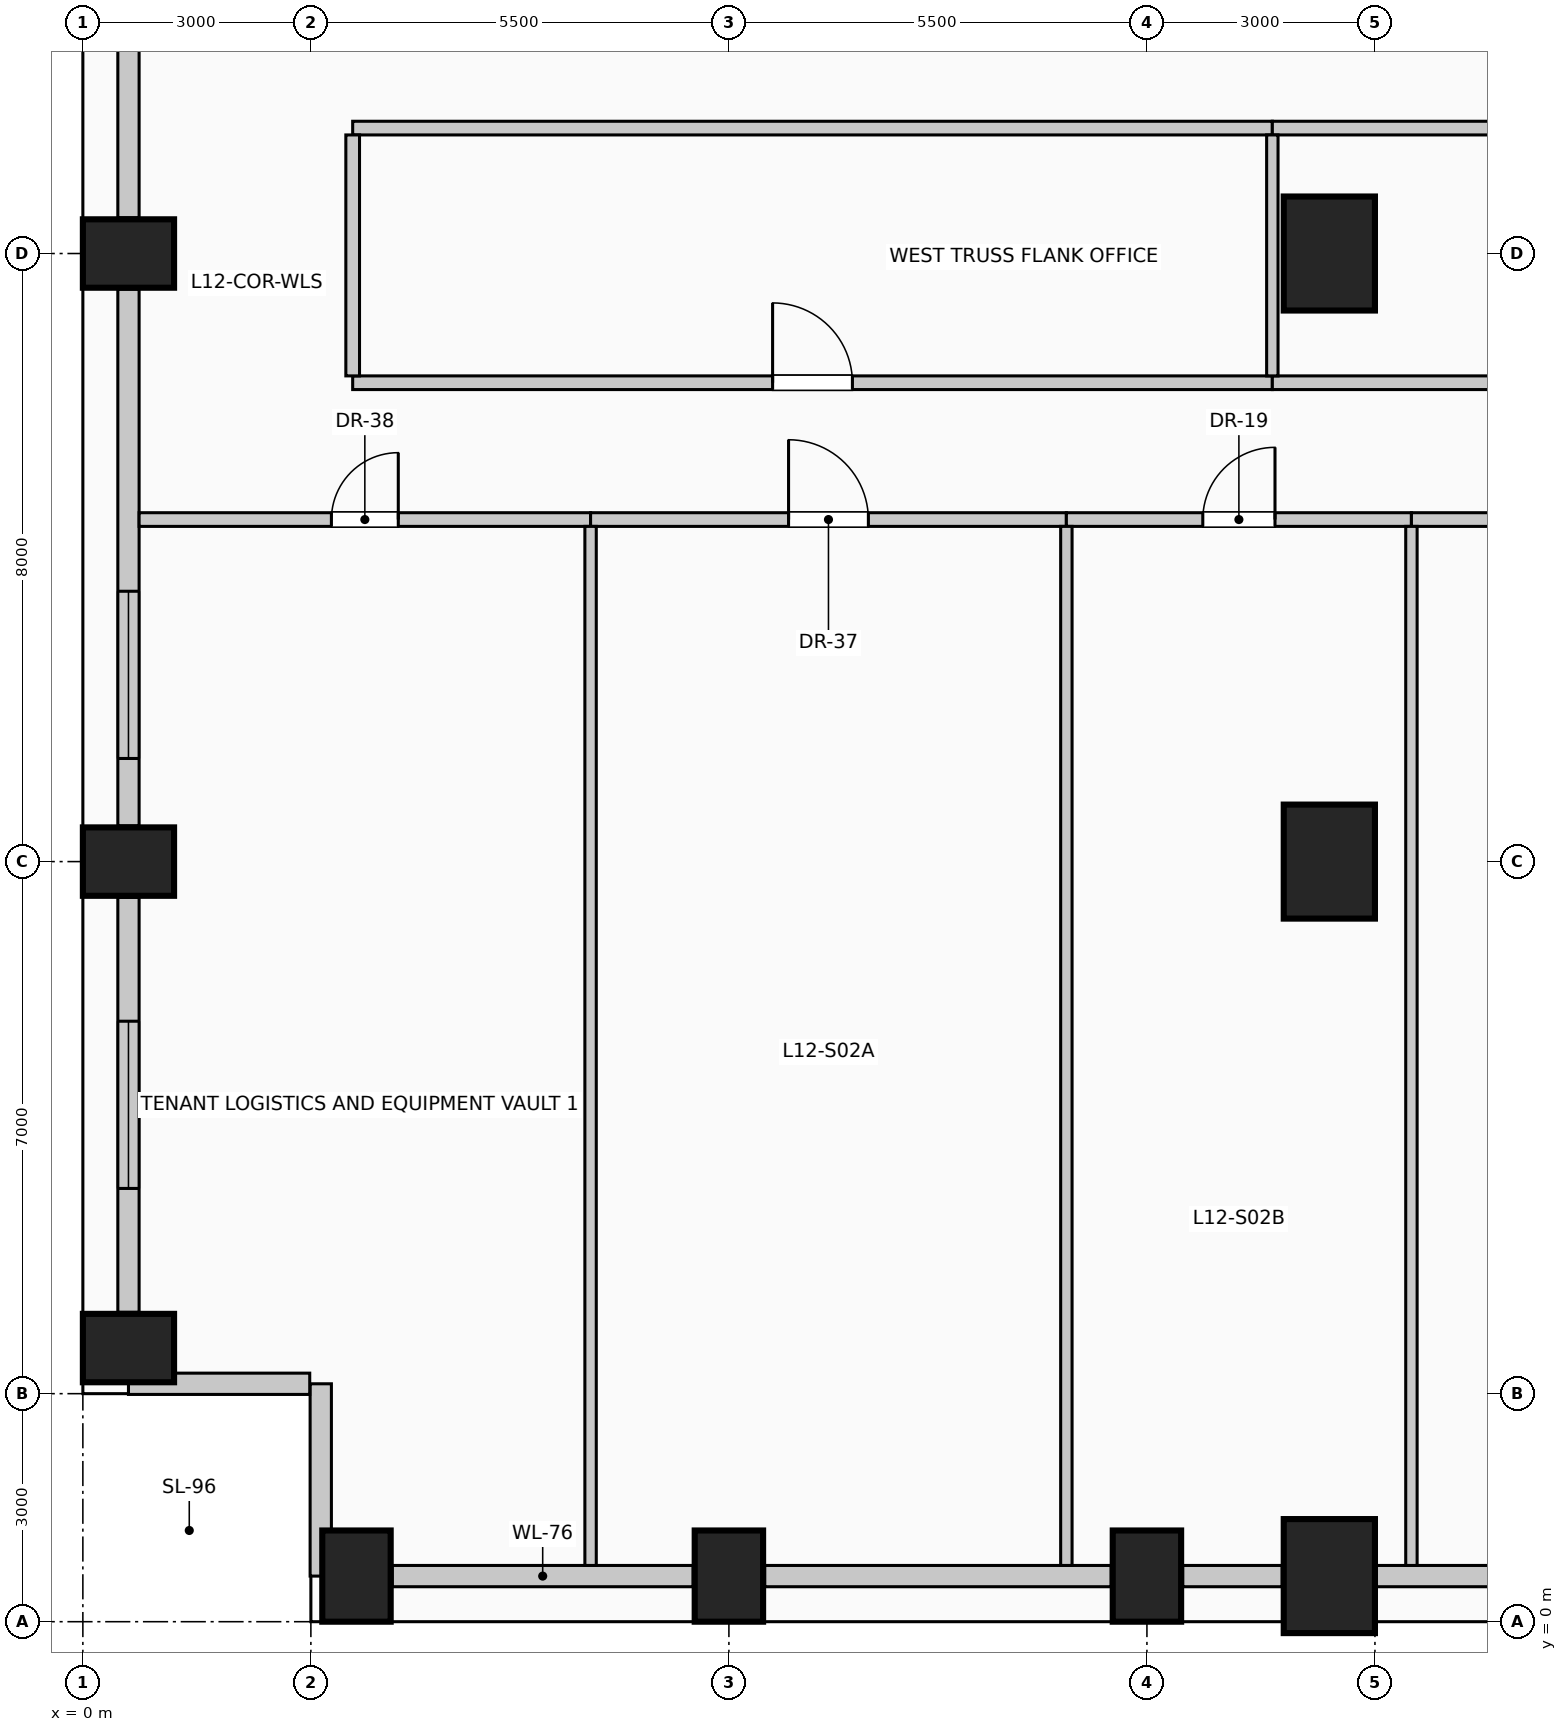
"""IFC4 building model, lengths in metres.
Left out: names, types, materials, properties, quantities, classifications, styles, units other than length and angle.
Written with IfcOpenShell. Run it as: python <this file> out.ifc"""

import sys

from ifc_helpers import new_model, si_unit, direction, frame, frame_2d, origin, origin_2d, place, context, subcontext, project, spatial, rectangle, extrude, element, fill, save


model = new_model("IFC4")
c1 = context("Model", 3, precision=1e-05, world=origin(), true_north=direction((0.0, 1.0)))
c2 = subcontext(c1, "Body", "Model", "MODEL_VIEW")
j1 = project(units=[si_unit("LENGTHUNIT", "METRE"), si_unit("PLANEANGLEUNIT", "RADIAN")], contexts=[c1])
p1 = place(None, origin())
s1 = spatial("IfcSite", under=j1, at=p1, CompositionType="ELEMENT")
p2 = place(p1, origin())
s2 = spatial("IfcBuilding", under=s1, at=p2, CompositionType="ELEMENT")
p3 = place(p2, frame((0.0, 0.0, 50.6)))
s3 = spatial("IfcBuildingStorey", under=s2, at=p3, CompositionType="ELEMENT", Elevation=50.6)
for number, where, z_axis, x_axis in (
    (1, (3.6, 0.6, 0.0), (0.0, 0.0, 1.0), (1.0, 0.0, 0.0)),
    (2, (8.5, 0.6, 0.0), (0.0, 0.0, 1.0), (1.0, 0.0, 0.0)),
    (3, (14.0, 0.6, 0.0), (0.0, 0.0, 1.0), (1.0, 0.0, 0.0)),
):
    element("IfcColumn", number, at=place(p3, frame(where, z_axis=z_axis, x_axis=x_axis)), inside=s3, PredefinedType="COLUMN", context=c2, shape_type="SweptSolid", body=[
        extrude(rectangle(XDim=0.9, YDim=1.2, at=origin_2d()), origin(), (0.0, 0.0, 1.0), 4.0),
    ])
p4 = place(p3, frame((16.4, 0.6, 0.0), z_axis=(0.0, 0.0, 1.0), x_axis=(1.0, 0.0, 0.0)))
e4 = element("IfcColumn", 4, at=p4, inside=s3, PredefinedType="COLUMN", context=c2, shape_type="SweptSolid", body=[
    extrude(rectangle(XDim=1.2, YDim=1.5, at=origin_2d()), origin(), (0.0, 0.0, 1.0), 4.0),
])
for number, where, z_axis, x_axis in (
    (5, (0.6, 3.6, 0.0), (0.0, 0.0, 1.0), (0.0, 1.0, 0.0)),
    (6, (0.6, 10.0, 0.0), (0.0, 0.0, 1.0), (0.0, 1.0, 0.0)),
    (7, (0.6, 18.0, 0.0), (0.0, 0.0, 1.0), (0.0, 1.0, 0.0)),
):
    element("IfcColumn", number, at=place(p3, frame(where, z_axis=z_axis, x_axis=x_axis)), inside=s3, PredefinedType="COLUMN", context=c2, shape_type="SweptSolid", body=[
        extrude(rectangle(XDim=0.9, YDim=1.2, at=origin_2d()), origin(), (0.0, 0.0, 1.0), 4.0),
    ])
for number, where, z_axis, x_axis in (
    (8, (16.4, 10.0, 0.0), (0.0, 0.0, 1.0), (1.0, 0.0, 0.0)),
    (9, (16.4, 18.0, 0.0), (0.0, 0.0, 1.0), (1.0, 0.0, 0.0)),
):
    element("IfcColumn", number, at=place(p3, frame(where, z_axis=z_axis, x_axis=x_axis)), inside=s3, PredefinedType="COLUMN", context=c2, shape_type="SweptSolid", body=[
        extrude(rectangle(XDim=1.2, YDim=1.5, at=origin_2d()), origin(), (0.0, 0.0, 1.0), 4.0),
    ])
p5 = place(p3, frame((8.03, 0.6, 0.0), z_axis=(0.0, 0.0, 1.0), x_axis=(-1.0, 0.0, 0.0)))
e10 = element("IfcWall", 10, at=p5, inside=s3, PredefinedType="SOLIDWALL", context=c2, shape_type="SweptSolid", body=[
    extrude(rectangle(XDim=3.96, YDim=0.28, at=frame_2d((1.98, 0.0))), origin(), (0.0, 0.0, 1.0), 2.85),
])
p6 = place(p3, frame((13.53, 0.6, 0.0), z_axis=(0.0, 0.0, 1.0), x_axis=(-1.0, 0.0, 0.0)))
e11 = element("IfcWall", 11, at=p6, inside=s3, PredefinedType="SOLIDWALL", context=c2, shape_type="SweptSolid", body=[
    extrude(rectangle(XDim=4.56, YDim=0.28, at=frame_2d((2.28, 0.0))), origin(), (0.0, 0.0, 1.0), 2.85),
])
p7 = place(p3, frame((15.78, 0.6, 0.0), z_axis=(0.0, 0.0, 1.0), x_axis=(-1.0, 0.0, 0.0)))
e12 = element("IfcWall", 12, at=p7, inside=s3, PredefinedType="SOLIDWALL", context=c2, shape_type="SweptSolid", body=[
    extrude(rectangle(XDim=1.31, YDim=0.28, at=frame_2d((0.655, 0.0))), origin(), (0.0, 0.0, 1.0), 2.85),
])
p8 = place(p3, frame((23.38, 0.6, 0.0), z_axis=(0.0, 0.0, 1.0), x_axis=(-1.0, 0.0, 0.0)))
e13 = element("IfcWall", 13, at=p8, inside=s3, PredefinedType="SOLIDWALL", context=c2, shape_type="SweptSolid", body=[
    extrude(rectangle(XDim=6.36, YDim=0.28, at=frame_2d((3.18, 0.0))), origin(), (0.0, 0.0, 1.0), 2.85),
])
p9 = place(p3, frame((0.6, 4.07, 0.0), z_axis=(0.0, 0.0, 1.0), x_axis=(0.0, 1.0, 0.0)))
e14 = element("IfcWall", 14, at=p9, inside=s3, PredefinedType="SOLIDWALL", context=c2, shape_type="SweptSolid", body=[
    extrude(rectangle(XDim=5.46, YDim=0.28, at=frame_2d((2.73, 0.0))), origin(), (0.0, 0.0, 1.0), 2.85),
])
p10 = place(p9, frame((1.63, 0.0, 0.5)))
e15 = element("IfcOpeningElement", 15, at=p10, cuts=e14, PredefinedType="OPENING", context=c2, shape_type="SweptSolid", body=[
    extrude(rectangle(XDim=2.2, YDim=1.95, at=frame_2d((1.1, 0.975))), frame((0.0, 0.15, 0.0), z_axis=(0.0, -1.0, 0.0), x_axis=(1.0, 0.0, 0.0)), (0.0, 0.0, 1.0), 0.3),
])
p11 = place(p3, frame((0.6, 10.47, 0.0), z_axis=(0.0, 0.0, 1.0), x_axis=(0.0, 1.0, 0.0)))
e16 = element("IfcWall", 16, at=p11, inside=s3, PredefinedType="SOLIDWALL", context=c2, shape_type="SweptSolid", body=[
    extrude(rectangle(XDim=7.06, YDim=0.28, at=frame_2d((3.53, 0.0))), origin(), (0.0, 0.0, 1.0), 2.85),
])
p12 = place(p11, frame((0.887, 0.0, 0.5)))
e17 = element("IfcOpeningElement", 17, at=p12, cuts=e16, PredefinedType="OPENING", context=c2, shape_type="SweptSolid", body=[
    extrude(rectangle(XDim=2.2, YDim=1.95, at=frame_2d((1.1, 0.975))), frame((0.0, 0.15, 0.0), z_axis=(0.0, -1.0, 0.0), x_axis=(1.0, 0.0, 0.0)), (0.0, 0.0, 1.0), 0.3),
])
p13 = place(p3, frame((0.6, 18.47, 0.0), z_axis=(0.0, 0.0, 1.0), x_axis=(0.0, 1.0, 0.0)))
e18 = element("IfcWall", 18, at=p13, inside=s3, PredefinedType="SOLIDWALL", context=c2, shape_type="SweptSolid", body=[
    extrude(rectangle(XDim=7.06, YDim=0.28, at=frame_2d((3.53, 0.0))), origin(), (0.0, 0.0, 1.0), 2.85),
])
p14 = place(p3, frame((3.13, 0.6, 0.0), z_axis=(0.0, 0.0, 1.0), x_axis=(0.0, 1.0, 0.0)))
e19 = element("IfcWall", 19, at=p14, inside=s3, PredefinedType="SOLIDWALL", context=c2, shape_type="SweptSolid", body=[
    extrude(rectangle(XDim=2.53, YDim=0.28, at=frame_2d((1.265, 0.0))), origin(), (0.0, 0.0, 1.0), 3.7),
])
p15 = place(p3, frame((2.985, 3.13, 0.0), z_axis=(0.0, 0.0, 1.0), x_axis=(-1.0, 0.0, 0.0)))
e20 = element("IfcWall", 20, at=p15, inside=s3, PredefinedType="SOLIDWALL", context=c2, shape_type="SweptSolid", body=[
    extrude(rectangle(XDim=2.385, YDim=0.28, at=frame_2d((1.192, 0.0))), origin(), (0.0, 0.0, 1.0), 3.7),
])
p16 = place(p3, frame((0.74, 14.5, 0.0), z_axis=(0.0, 0.0, 1.0), x_axis=(1.0, 0.0, 0.0)))
e21 = element("IfcWall", 21, at=p16, inside=s3, PredefinedType="PARTITIONING", context=c2, shape_type="SweptSolid", body=[
    extrude(rectangle(XDim=5.94, YDim=0.18, at=frame_2d((2.97, 0.0))), origin(), (0.0, 0.0, 1.0), 3.7),
])
p17 = place(p16, frame((2.53, 0.0, 0.0)))
e22 = element("IfcOpeningElement", 22, at=p17, cuts=e21, PredefinedType="OPENING", context=c2, shape_type="SweptSolid", body=[
    extrude(rectangle(XDim=0.88, YDim=2.1, at=frame_2d((0.44, 1.05))), frame((0.0, 0.1, 0.0), z_axis=(0.0, -1.0, 0.0), x_axis=(1.0, 0.0, 0.0)), (0.0, 0.0, 1.0), 0.2),
])
p18 = place(p3, frame((6.68, 14.5, 0.0), z_axis=(0.0, 0.0, 1.0), x_axis=(1.0, 0.0, 0.0)))
e23 = element("IfcWall", 23, at=p18, inside=s3, PredefinedType="PARTITIONING", context=c2, shape_type="SweptSolid", body=[
    extrude(rectangle(XDim=6.26, YDim=0.18, at=frame_2d((3.13, 0.0))), origin(), (0.0, 0.0, 1.0), 3.7),
])
p19 = place(p18, frame((2.605, 0.0, 0.0)))
e24 = element("IfcOpeningElement", 24, at=p19, cuts=e23, PredefinedType="OPENING", context=c2, shape_type="SweptSolid", body=[
    extrude(rectangle(XDim=1.05, YDim=2.15, at=frame_2d((0.525, 1.075))), frame((0.0, 0.1, 0.0), z_axis=(0.0, -1.0, 0.0), x_axis=(1.0, 0.0, 0.0)), (0.0, 0.0, 1.0), 0.2),
])
p20 = place(p3, frame((12.94, 14.5, 0.0), z_axis=(0.0, 0.0, 1.0), x_axis=(1.0, 0.0, 0.0)))
e25 = element("IfcWall", 25, at=p20, inside=s3, PredefinedType="PARTITIONING", context=c2, shape_type="SweptSolid", body=[
    extrude(rectangle(XDim=4.54, YDim=0.18, at=frame_2d((2.27, 0.0))), origin(), (0.0, 0.0, 1.0), 3.7),
])
p21 = place(p20, frame((1.795, 0.0, 0.0)))
e26 = element("IfcOpeningElement", 26, at=p21, cuts=e25, PredefinedType="OPENING", context=c2, shape_type="SweptSolid", body=[
    extrude(rectangle(XDim=0.95, YDim=2.15, at=frame_2d((0.475, 1.075))), frame((0.0, 0.1, 0.0), z_axis=(0.0, -1.0, 0.0), x_axis=(1.0, 0.0, 0.0)), (0.0, 0.0, 1.0), 0.2),
])
p22 = place(p3, frame((17.48, 14.5, 0.0), z_axis=(0.0, 0.0, 1.0), x_axis=(1.0, 0.0, 0.0)))
e27 = element("IfcWall", 27, at=p22, inside=s3, PredefinedType="PARTITIONING", context=c2, shape_type="SweptSolid", body=[
    extrude(rectangle(XDim=11.52, YDim=0.18, at=frame_2d((5.76, 0.0))), origin(), (0.0, 0.0, 1.0), 3.7),
])
p23 = place(p22, frame((5.235, 0.0, 0.0)))
e28 = element("IfcOpeningElement", 28, at=p23, cuts=e27, PredefinedType="OPENING", context=c2, shape_type="SweptSolid", body=[
    extrude(rectangle(XDim=1.05, YDim=2.15, at=frame_2d((0.525, 1.075))), frame((0.0, 0.1, 0.0), z_axis=(0.0, -1.0, 0.0), x_axis=(1.0, 0.0, 0.0)), (0.0, 0.0, 1.0), 0.2),
])
p24 = place(p3, frame((3.55, 16.3, 0.0), z_axis=(0.0, 0.0, 1.0), x_axis=(1.0, 0.0, 0.0)))
e29 = element("IfcWall", 29, at=p24, inside=s3, PredefinedType="PARTITIONING", context=c2, shape_type="SweptSolid", body=[
    extrude(rectangle(XDim=12.1, YDim=0.18, at=frame_2d((6.05, 0.0))), origin(), (0.0, 0.0, 1.0), 3.7),
])
p25 = place(p24, frame((5.525, 0.0, 0.0)))
e30 = element("IfcOpeningElement", 30, at=p25, cuts=e29, PredefinedType="OPENING", context=c2, shape_type="SweptSolid", body=[
    extrude(rectangle(XDim=1.05, YDim=2.15, at=frame_2d((0.525, 1.075))), frame((0.0, 0.1, 0.0), z_axis=(0.0, -1.0, 0.0), x_axis=(1.0, 0.0, 0.0)), (0.0, 0.0, 1.0), 0.2),
])
p26 = place(p3, frame((15.65, 16.3, 0.0), z_axis=(0.0, 0.0, 1.0), x_axis=(1.0, 0.0, 0.0)))
e31 = element("IfcWall", 31, at=p26, inside=s3, PredefinedType="PARTITIONING", context=c2, shape_type="SweptSolid", body=[
    extrude(rectangle(XDim=26.7, YDim=0.18, at=frame_2d((13.35, 0.0))), origin(), (0.0, 0.0, 1.0), 3.7),
])
p27 = place(p3, frame((3.55, 19.65, 0.0), z_axis=(0.0, 0.0, 1.0), x_axis=(1.0, 0.0, 0.0)))
e32 = element("IfcWall", 32, at=p27, inside=s3, PredefinedType="PARTITIONING", context=c2, shape_type="SweptSolid", body=[
    extrude(rectangle(XDim=12.1, YDim=0.18, at=frame_2d((6.05, 0.0))), origin(), (0.0, 0.0, 1.0), 3.7),
])
p28 = place(p3, frame((15.65, 19.65, 0.0), z_axis=(0.0, 0.0, 1.0), x_axis=(1.0, 0.0, 0.0)))
e33 = element("IfcWall", 33, at=p28, inside=s3, PredefinedType="PARTITIONING", context=c2, shape_type="SweptSolid", body=[
    extrude(rectangle(XDim=26.7, YDim=0.18, at=frame_2d((13.35, 0.0))), origin(), (0.0, 0.0, 1.0), 3.7),
])
p29 = place(p3, frame((3.55, 16.39, 0.0), z_axis=(0.0, 0.0, 1.0), x_axis=(0.0, 1.0, 0.0)))
e34 = element("IfcWall", 34, at=p29, inside=s3, PredefinedType="PARTITIONING", context=c2, shape_type="SweptSolid", body=[
    extrude(rectangle(XDim=3.17, YDim=0.18, at=frame_2d((1.585, 0.0))), origin(), (0.0, 0.0, 1.0), 3.7),
])
for number, where, z_axis, x_axis in (
    (35, (6.68, 0.74, 0.0), (0.0, 0.0, 1.0), (0.0, 1.0, 0.0)),
    (36, (12.94, 0.74, 0.0), (0.0, 0.0, 1.0), (0.0, 1.0, 0.0)),
):
    element("IfcWall", number, at=place(p3, frame(where, z_axis=z_axis, x_axis=x_axis)), inside=s3, PredefinedType="PARTITIONING", context=c2, shape_type="SweptSolid", body=[
        extrude(rectangle(XDim=13.67, YDim=0.15, at=frame_2d((6.835, 0.0))), origin(), (0.0, 0.0, 1.0), 3.7),
    ])
p30 = place(p3, frame((15.65, 16.39, 0.0), z_axis=(0.0, 0.0, 1.0), x_axis=(0.0, 1.0, 0.0)))
e37 = element("IfcWall", 37, at=p30, inside=s3, PredefinedType="PARTITIONING", context=c2, shape_type="SweptSolid", body=[
    extrude(rectangle(XDim=3.17, YDim=0.15, at=frame_2d((1.585, 0.0))), origin(), (0.0, 0.0, 1.0), 3.7),
])
p31 = place(p3, frame((17.48, 0.74, 0.0), z_axis=(0.0, 0.0, 1.0), x_axis=(0.0, 1.0, 0.0)))
e38 = element("IfcWall", 38, at=p31, inside=s3, PredefinedType="PARTITIONING", context=c2, shape_type="SweptSolid", body=[
    extrude(rectangle(XDim=13.67, YDim=0.15, at=frame_2d((6.835, 0.0))), origin(), (0.0, 0.0, 1.0), 3.7),
])
p32 = place(p10, origin())
e39 = element("IfcWindow", 39, at=p32, inside=s3, PartitioningType="SINGLE_PANEL", PredefinedType="WINDOW", context=c2, shape_type="SweptSolid", body=[
    extrude(rectangle(XDim=2.2, YDim=1.95, at=frame_2d((1.1, 0.975))), frame((0.0, 0.03, 0.0), z_axis=(0.0, -1.0, 0.0), x_axis=(1.0, 0.0, 0.0)), (0.0, 0.0, 1.0), 0.06),
])
fill(e15, e39)
p33 = place(p12, origin())
e40 = element("IfcWindow", 40, at=p33, inside=s3, PartitioningType="SINGLE_PANEL", PredefinedType="WINDOW", context=c2, shape_type="SweptSolid", body=[
    extrude(rectangle(XDim=2.2, YDim=1.95, at=frame_2d((1.1, 0.975))), frame((0.0, 0.03, 0.0), z_axis=(0.0, -1.0, 0.0), x_axis=(1.0, 0.0, 0.0)), (0.0, 0.0, 1.0), 0.06),
])
fill(e17, e40)
p34 = place(p17, origin())
e41 = element("IfcDoor", 41, at=p34, inside=s3, OperationType="SINGLE_SWING_RIGHT", PredefinedType="DOOR", context=c2, shape_type="SweptSolid", body=[
    extrude(rectangle(XDim=0.88, YDim=2.1, at=frame_2d((0.44, 1.05))), frame((0.0, 0.025, 0.0), z_axis=(0.0, -1.0, 0.0), x_axis=(1.0, 0.0, 0.0)), (0.0, 0.0, 1.0), 0.05),
])
fill(e22, e41)
p35 = place(p19, origin())
e42 = element("IfcDoor", 42, at=p35, inside=s3, OperationType="SINGLE_SWING_LEFT", PredefinedType="DOOR", context=c2, shape_type="SweptSolid", body=[
    extrude(rectangle(XDim=1.05, YDim=2.15, at=frame_2d((0.525, 1.075))), frame((0.0, 0.025, 0.0), z_axis=(0.0, -1.0, 0.0), x_axis=(1.0, 0.0, 0.0)), (0.0, 0.0, 1.0), 0.05),
])
fill(e24, e42)
p36 = place(p21, origin())
e43 = element("IfcDoor", 43, at=p36, inside=s3, OperationType="SINGLE_SWING_RIGHT", PredefinedType="DOOR", context=c2, shape_type="SweptSolid", body=[
    extrude(rectangle(XDim=0.95, YDim=2.15, at=frame_2d((0.475, 1.075))), frame((0.0, 0.025, 0.0), z_axis=(0.0, -1.0, 0.0), x_axis=(1.0, 0.0, 0.0)), (0.0, 0.0, 1.0), 0.05),
])
fill(e26, e43)
p37 = place(p25, origin())
e44 = element("IfcDoor", 44, at=p37, inside=s3, OperationType="SINGLE_SWING_LEFT", PredefinedType="DOOR", context=c2, shape_type="SweptSolid", body=[
    extrude(rectangle(XDim=1.05, YDim=2.15, at=frame_2d((0.525, 1.075))), frame((0.0, 0.025, 0.0), z_axis=(0.0, -1.0, 0.0), x_axis=(1.0, 0.0, 0.0)), (0.0, 0.0, 1.0), 0.05),
])
fill(e30, e44)
save(model, sys.argv[1])
